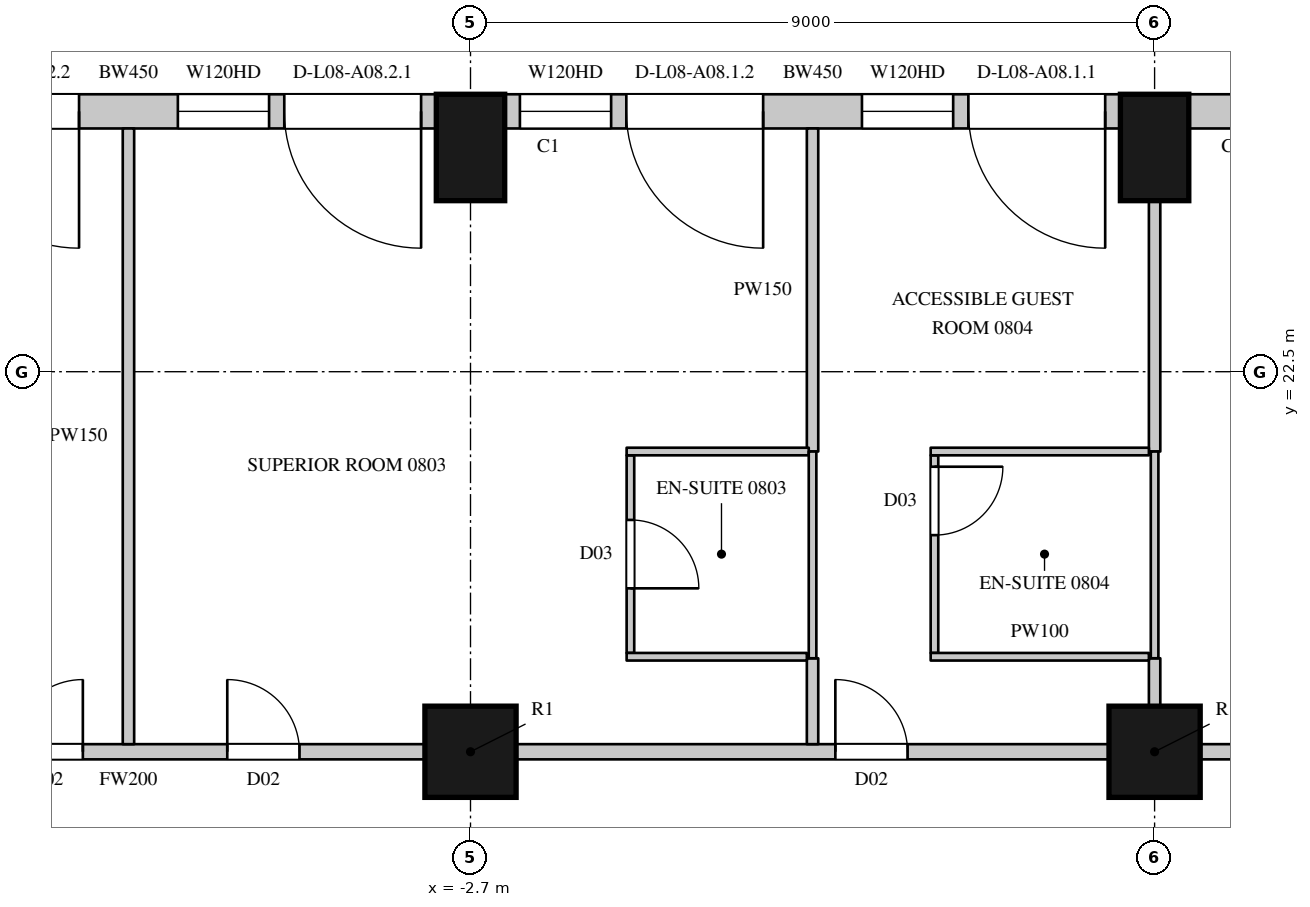
"""IFC4 building model, lengths in metres.
Left out: names, types, materials, properties, quantities, classifications, styles, units other than length and angle.
Written with IfcOpenShell. Run it as: python <this file> out.ifc"""

import sys

from ifc_helpers import new_model, si_unit, direction, frame, frame_2d, origin, origin_2d, place, context, subcontext, project, spatial, rectangle, circle, extrude, element, fill, save


model = new_model("IFC4")
c1 = context("Model", 3, precision=1e-05, world=origin(), true_north=direction((0.0, 1.0)))
c2 = subcontext(c1, "Body", "Model", "MODEL_VIEW")
j1 = project(units=[si_unit("LENGTHUNIT", "METRE"), si_unit("PLANEANGLEUNIT", "RADIAN")], contexts=[c1])
p1 = place(None, origin())
s1 = spatial("IfcSite", under=j1, at=p1, CompositionType="ELEMENT")
p2 = place(p1, origin())
s2 = spatial("IfcBuilding", under=s1, at=p2, CompositionType="ELEMENT")
p3 = place(p2, frame((0.0, 0.0, 59.1)))
s3 = spatial("IfcBuildingStorey", under=s2, at=p3, CompositionType="ELEMENT", Elevation=59.1)
for number, where, z_axis, x_axis in (
    (1, (6.3, 25.45, 0.0), (0.0, 0.0, 1.0), (-1.0, 0.0, 0.0)),
    (2, (-2.7, 25.45, 0.0), (0.0, 0.0, 1.0), (-1.0, 0.0, 0.0)),
):
    element("IfcColumn", number, at=place(p3, frame(where, z_axis=z_axis, x_axis=x_axis)), inside=s3, PredefinedType="COLUMN", context=c2, shape_type="SweptSolid", body=[
        extrude(rectangle(XDim=0.9, YDim=1.4, at=origin_2d()), origin(), (0.0, 0.0, 1.0), 3.6),
    ])
for number, where, z_axis, x_axis in (
    (3, (-2.7, 17.5, 0.0), (0.0, 0.0, 1.0), (1.0, 0.0, 0.0)),
    (4, (6.3, 17.5, 0.0), (0.0, 0.0, 1.0), (1.0, 0.0, 0.0)),
):
    element("IfcColumn", number, at=place(p3, frame(where, z_axis=z_axis, x_axis=x_axis)), inside=s3, PredefinedType="COLUMN", context=c2, shape_type="SweptSolid", body=[
        extrude(circle(Radius=0.6, at=origin_2d()), origin(), (0.0, 0.0, 1.0), 3.6),
    ])
p4 = place(p3, frame((11.989, 25.925, 0.0), z_axis=(0.0, 0.0, 1.0), x_axis=(-1.0, 0.0, 0.0)))
e5 = element("IfcWall", 5, at=p4, inside=s3, PredefinedType="SOLIDWALL", context=c2, shape_type="SweptSolid", body=[
    extrude(rectangle(XDim=5.239, YDim=0.45, at=frame_2d((2.619, 0.0))), origin(), (0.0, 0.0, 1.0), 3.3),
])
p5 = place(p4, frame((1.77, 0.0, 1.05)))
e6 = element("IfcOpeningElement", 6, at=p5, cuts=e5, PredefinedType="OPENING", context=c2, shape_type="SweptSolid", body=[
    extrude(rectangle(XDim=2.1, YDim=2.0, at=frame_2d((1.05, 1.0))), frame((0.0, 0.235, 0.0), z_axis=(0.0, -1.0, 0.0), x_axis=(1.0, 0.0, 0.0)), (0.0, 0.0, 1.0), 0.47),
])
p6 = place(p3, frame((5.85, 25.925, 0.0), z_axis=(0.0, 0.0, 1.0), x_axis=(-1.0, 0.0, 0.0)))
e7 = element("IfcWall", 7, at=p6, inside=s3, PredefinedType="SOLIDWALL", context=c2, shape_type="SweptSolid", body=[
    extrude(rectangle(XDim=8.1, YDim=0.45, at=frame_2d((4.05, 0.0))), origin(), (0.0, 0.0, 1.0), 3.3),
])
p7 = place(p6, frame((0.2, 0.0, 0.0)))
e8 = element("IfcOpeningElement", 8, at=p7, cuts=e7, PredefinedType="OPENING", context=c2, shape_type="SweptSolid", body=[
    extrude(rectangle(XDim=1.8, YDim=2.4, at=frame_2d((0.9, 1.2))), frame((0.0, 0.235, 0.0), z_axis=(0.0, -1.0, 0.0), x_axis=(1.0, 0.0, 0.0)), (0.0, 0.0, 1.0), 0.47),
])
p8 = place(p6, frame((2.2, 0.0, 1.05)))
e9 = element("IfcOpeningElement", 9, at=p8, cuts=e7, PredefinedType="OPENING", context=c2, shape_type="SweptSolid", body=[
    extrude(rectangle(XDim=1.2, YDim=2.0, at=frame_2d((0.6, 1.0))), frame((0.0, 0.235, 0.0), z_axis=(0.0, -1.0, 0.0), x_axis=(1.0, 0.0, 0.0)), (0.0, 0.0, 1.0), 0.47),
])
p9 = place(p6, frame((4.7, 0.0, 0.0)))
e10 = element("IfcOpeningElement", 10, at=p9, cuts=e7, PredefinedType="OPENING", context=c2, shape_type="SweptSolid", body=[
    extrude(rectangle(XDim=1.8, YDim=2.4, at=frame_2d((0.9, 1.2))), frame((0.0, 0.235, 0.0), z_axis=(0.0, -1.0, 0.0), x_axis=(1.0, 0.0, 0.0)), (0.0, 0.0, 1.0), 0.47),
])
p10 = place(p6, frame((6.7, 0.0, 1.05)))
e11 = element("IfcOpeningElement", 11, at=p10, cuts=e7, PredefinedType="OPENING", context=c2, shape_type="SweptSolid", body=[
    extrude(rectangle(XDim=1.2, YDim=2.0, at=frame_2d((0.6, 1.0))), frame((0.0, 0.235, 0.0), z_axis=(0.0, -1.0, 0.0), x_axis=(1.0, 0.0, 0.0)), (0.0, 0.0, 1.0), 0.47),
])
p11 = place(p3, frame((-3.15, 25.925, 0.0), z_axis=(0.0, 0.0, 1.0), x_axis=(-1.0, 0.0, 0.0)))
e12 = element("IfcWall", 12, at=p11, inside=s3, PredefinedType="SOLIDWALL", context=c2, shape_type="SweptSolid", body=[
    extrude(rectangle(XDim=8.1, YDim=0.45, at=frame_2d((4.05, 0.0))), origin(), (0.0, 0.0, 1.0), 3.3),
])
p12 = place(p11, frame((0.2, 0.0, 0.0)))
e13 = element("IfcOpeningElement", 13, at=p12, cuts=e12, PredefinedType="OPENING", context=c2, shape_type="SweptSolid", body=[
    extrude(rectangle(XDim=1.8, YDim=2.4, at=frame_2d((0.9, 1.2))), frame((0.0, 0.235, 0.0), z_axis=(0.0, -1.0, 0.0), x_axis=(1.0, 0.0, 0.0)), (0.0, 0.0, 1.0), 0.47),
])
p13 = place(p11, frame((2.2, 0.0, 1.05)))
e14 = element("IfcOpeningElement", 14, at=p13, cuts=e12, PredefinedType="OPENING", context=c2, shape_type="SweptSolid", body=[
    extrude(rectangle(XDim=1.2, YDim=2.0, at=frame_2d((0.6, 1.0))), frame((0.0, 0.235, 0.0), z_axis=(0.0, -1.0, 0.0), x_axis=(1.0, 0.0, 0.0)), (0.0, 0.0, 1.0), 0.47),
])
p14 = place(p11, frame((4.7, 0.0, 0.0)))
e15 = element("IfcOpeningElement", 15, at=p14, cuts=e12, PredefinedType="OPENING", context=c2, shape_type="SweptSolid", body=[
    extrude(rectangle(XDim=1.8, YDim=2.4, at=frame_2d((0.9, 1.2))), frame((0.0, 0.235, 0.0), z_axis=(0.0, -1.0, 0.0), x_axis=(1.0, 0.0, 0.0)), (0.0, 0.0, 1.0), 0.47),
])
p15 = place(p11, frame((6.7, 0.0, 1.05)))
e16 = element("IfcOpeningElement", 16, at=p15, cuts=e12, PredefinedType="OPENING", context=c2, shape_type="SweptSolid", body=[
    extrude(rectangle(XDim=1.2, YDim=2.0, at=frame_2d((0.6, 1.0))), frame((0.0, 0.235, 0.0), z_axis=(0.0, -1.0, 0.0), x_axis=(1.0, 0.0, 0.0)), (0.0, 0.0, 1.0), 0.47),
])
p16 = place(p3, frame((-11.1, 17.5, 0.0), z_axis=(0.0, 0.0, 1.0), x_axis=(1.0, 0.0, 0.0)))
e17 = element("IfcWall", 17, at=p16, inside=s3, PredefinedType="PARTITIONING", context=c2, shape_type="SweptSolid", body=[
    extrude(rectangle(XDim=7.8, YDim=0.2, at=frame_2d((3.9, 0.0))), origin(), (0.0, 0.0, 1.0), 2.75),
])
p17 = place(p16, frame((2.35, 0.0, 0.0)))
e18 = element("IfcOpeningElement", 18, at=p17, cuts=e17, PredefinedType="OPENING", context=c2, shape_type="SweptSolid", body=[
    extrude(rectangle(XDim=0.95, YDim=2.2, at=frame_2d((0.475, 1.1))), frame((0.0, 0.11, 0.0), z_axis=(0.0, -1.0, 0.0), x_axis=(1.0, 0.0, 0.0)), (0.0, 0.0, 1.0), 0.22),
])
p18 = place(p16, frame((5.2, 0.0, 0.0)))
e19 = element("IfcOpeningElement", 19, at=p18, cuts=e17, PredefinedType="OPENING", context=c2, shape_type="SweptSolid", body=[
    extrude(rectangle(XDim=0.95, YDim=2.2, at=frame_2d((0.475, 1.1))), frame((0.0, 0.11, 0.0), z_axis=(0.0, -1.0, 0.0), x_axis=(1.0, 0.0, 0.0)), (0.0, 0.0, 1.0), 0.22),
])
p19 = place(p3, frame((-2.1, 17.5, 0.0), z_axis=(0.0, 0.0, 1.0), x_axis=(1.0, 0.0, 0.0)))
e20 = element("IfcWall", 20, at=p19, inside=s3, PredefinedType="PARTITIONING", context=c2, shape_type="SweptSolid", body=[
    extrude(rectangle(XDim=7.8, YDim=0.2, at=frame_2d((3.9, 0.0))), origin(), (0.0, 0.0, 1.0), 2.75),
])
p20 = place(p19, frame((4.2, 0.0, 0.0)))
e21 = element("IfcOpeningElement", 21, at=p20, cuts=e20, PredefinedType="OPENING", context=c2, shape_type="SweptSolid", body=[
    extrude(rectangle(XDim=0.95, YDim=2.2, at=frame_2d((0.475, 1.1))), frame((0.0, 0.11, 0.0), z_axis=(0.0, -1.0, 0.0), x_axis=(1.0, 0.0, 0.0)), (0.0, 0.0, 1.0), 0.22),
])
p21 = place(p3, frame((6.9, 17.5, 0.0), z_axis=(0.0, 0.0, 1.0), x_axis=(1.0, 0.0, 0.0)))
e22 = element("IfcWall", 22, at=p21, inside=s3, PredefinedType="PARTITIONING", context=c2, shape_type="SweptSolid", body=[
    extrude(rectangle(XDim=7.8, YDim=0.2, at=frame_2d((3.9, 0.0))), origin(), (0.0, 0.0, 1.0), 2.75),
])
p22 = place(p21, frame((1.45, 0.0, 0.0)))
e23 = element("IfcOpeningElement", 23, at=p22, cuts=e22, PredefinedType="OPENING", context=c2, shape_type="SweptSolid", body=[
    extrude(rectangle(XDim=1.1, YDim=2.4, at=frame_2d((0.55, 1.2))), frame((0.0, 0.11, 0.0), z_axis=(0.0, -1.0, 0.0), x_axis=(1.0, 0.0, 0.0)), (0.0, 0.0, 1.0), 0.22),
])
p23 = place(p3, frame((-7.2, 17.6, 0.0), z_axis=(0.0, 0.0, 1.0), x_axis=(0.0, 1.0, 0.0)))
e24 = element("IfcWall", 24, at=p23, inside=s3, PredefinedType="PARTITIONING", context=c2, shape_type="SweptSolid", body=[
    extrude(rectangle(XDim=8.1, YDim=0.15, at=frame_2d((4.05, 0.0))), origin(), (0.0, 0.0, 1.0), 2.65),
])
p24 = place(p3, frame((1.8, 17.6, 0.0), z_axis=(0.0, 0.0, 1.0), x_axis=(0.0, 1.0, 0.0)))
e25 = element("IfcWall", 25, at=p24, inside=s3, PredefinedType="PARTITIONING", context=c2, shape_type="SweptSolid", body=[
    extrude(rectangle(XDim=1.13, YDim=0.15, at=frame_2d((0.565, 0.0))), origin(), (0.0, 0.0, 1.0), 2.65),
])
p25 = place(p3, frame((1.8, 21.45, 0.0), z_axis=(0.0, 0.0, 1.0), x_axis=(0.0, 1.0, 0.0)))
e26 = element("IfcWall", 26, at=p25, inside=s3, PredefinedType="PARTITIONING", context=c2, shape_type="SweptSolid", body=[
    extrude(rectangle(XDim=4.25, YDim=0.15, at=frame_2d((2.125, 0.0))), origin(), (0.0, 0.0, 1.0), 2.65),
])
p26 = place(p3, frame((6.3, 18.1, 0.0), z_axis=(0.0, 0.0, 1.0), x_axis=(0.0, 1.0, 0.0)))
e27 = element("IfcWall", 27, at=p26, inside=s3, PredefinedType="PARTITIONING", context=c2, shape_type="SweptSolid", body=[
    extrude(rectangle(XDim=0.63, YDim=0.15, at=frame_2d((0.315, 0.0))), origin(), (0.0, 0.0, 1.0), 2.75),
])
p27 = place(p3, frame((6.3, 21.45, 0.0), z_axis=(0.0, 0.0, 1.0), x_axis=(0.0, 1.0, 0.0)))
e28 = element("IfcWall", 28, at=p27, inside=s3, PredefinedType="PARTITIONING", context=c2, shape_type="SweptSolid", body=[
    extrude(rectangle(XDim=3.3, YDim=0.15, at=frame_2d((1.65, 0.0))), origin(), (0.0, 0.0, 1.0), 2.75),
])
p28 = place(p3, frame((-0.596, 18.8, 0.0), z_axis=(0.0, 0.0, 1.0), x_axis=(0.0, 1.0, 0.0)))
e29 = element("IfcWall", 29, at=p28, inside=s3, PredefinedType="PARTITIONING", context=c2, shape_type="SweptSolid", body=[
    extrude(rectangle(XDim=2.6, YDim=0.1, at=frame_2d((1.3, 0.0))), origin(), (0.0, 0.0, 1.0), 3.3),
])
p29 = place(p28, frame((0.85, 0.0, 0.0)))
e30 = element("IfcOpeningElement", 30, at=p29, cuts=e29, PredefinedType="OPENING", context=c2, shape_type="SweptSolid", body=[
    extrude(rectangle(XDim=0.9, YDim=2.2, at=frame_2d((0.45, 1.1))), frame((0.0, 0.06, 0.0), z_axis=(0.0, -1.0, 0.0), x_axis=(1.0, 0.0, 0.0)), (0.0, 0.0, 1.0), 0.12),
])
p30 = place(p3, frame((-0.646, 18.75, 0.0), z_axis=(0.0, 0.0, 1.0), x_axis=(1.0, 0.0, 0.0)))
e31 = element("IfcWall", 31, at=p30, inside=s3, PredefinedType="PARTITIONING", context=c2, shape_type="SweptSolid", body=[
    extrude(rectangle(XDim=2.371, YDim=0.1, at=frame_2d((1.186, 0.0))), origin(), (0.0, 0.0, 1.0), 3.3),
])
p31 = place(p3, frame((-0.646, 21.45, 0.0), z_axis=(0.0, 0.0, 1.0), x_axis=(1.0, 0.0, 0.0)))
e32 = element("IfcWall", 32, at=p31, inside=s3, PredefinedType="PARTITIONING", context=c2, shape_type="SweptSolid", body=[
    extrude(rectangle(XDim=2.396, YDim=0.1, at=frame_2d((1.198, 0.0))), origin(), (0.0, 0.0, 1.0), 3.3),
])
p32 = place(p3, frame((1.8, 18.73, 0.0), z_axis=(0.0, 0.0, 1.0), x_axis=(0.0, 1.0, 0.0)))
e33 = element("IfcWall", 33, at=p32, inside=s3, PredefinedType="PARTITIONING", context=c2, shape_type="SweptSolid", body=[
    extrude(rectangle(XDim=2.72, YDim=0.1, at=frame_2d((1.36, 0.0))), origin(), (0.0, 0.0, 1.0), 2.65),
])
p33 = place(p3, frame((3.404, 18.8, 0.0), z_axis=(0.0, 0.0, 1.0), x_axis=(0.0, 1.0, 0.0)))
e34 = element("IfcWall", 34, at=p33, inside=s3, PredefinedType="PARTITIONING", context=c2, shape_type="SweptSolid", body=[
    extrude(rectangle(XDim=2.6, YDim=0.1, at=frame_2d((1.3, 0.0))), origin(), (0.0, 0.0, 1.0), 3.3),
])
p34 = place(p33, frame((1.55, 0.0, 0.0)))
e35 = element("IfcOpeningElement", 35, at=p34, cuts=e34, PredefinedType="OPENING", context=c2, shape_type="SweptSolid", body=[
    extrude(rectangle(XDim=0.9, YDim=2.2, at=frame_2d((0.45, 1.1))), frame((0.0, 0.06, 0.0), z_axis=(0.0, -1.0, 0.0), x_axis=(1.0, 0.0, 0.0)), (0.0, 0.0, 1.0), 0.12),
])
for number, where, z_axis, x_axis in (
    (36, (3.354, 18.75, 0.0), (0.0, 0.0, 1.0), (1.0, 0.0, 0.0)),
    (37, (3.354, 21.45, 0.0), (0.0, 0.0, 1.0), (1.0, 0.0, 0.0)),
):
    element("IfcWall", number, at=place(p3, frame(where, z_axis=z_axis, x_axis=x_axis)), inside=s3, PredefinedType="PARTITIONING", context=c2, shape_type="SweptSolid", body=[
        extrude(rectangle(XDim=2.871, YDim=0.1, at=frame_2d((1.436, 0.0))), origin(), (0.0, 0.0, 1.0), 3.3),
    ])
p35 = place(p3, frame((6.3, 18.73, 0.0), z_axis=(0.0, 0.0, 1.0), x_axis=(0.0, 1.0, 0.0)))
e38 = element("IfcWall", 38, at=p35, inside=s3, PredefinedType="PARTITIONING", context=c2, shape_type="SweptSolid", body=[
    extrude(rectangle(XDim=2.72, YDim=0.1, at=frame_2d((1.36, 0.0))), origin(), (0.0, 0.0, 1.0), 2.75),
])
p36 = place(p7, origin())
e39 = element("IfcDoor", 39, at=p36, inside=s3, OperationType="SLIDING_TO_LEFT", PredefinedType="DOOR", context=c2, shape_type="SweptSolid", body=[
    extrude(rectangle(XDim=1.8, YDim=2.4, at=frame_2d((0.9, 1.2))), frame((0.0, 0.13, 0.0), z_axis=(0.0, -1.0, 0.0), x_axis=(1.0, 0.0, 0.0)), (0.0, 0.0, 1.0), 0.05),
])
fill(e8, e39)
p37 = place(p8, origin())
e40 = element("IfcWindow", 40, at=p37, inside=s3, PartitioningType="SINGLE_PANEL", PredefinedType="WINDOW", context=c2, shape_type="SweptSolid", body=[
    extrude(rectangle(XDim=1.2, YDim=2.0, at=frame_2d((0.6, 1.0))), frame((0.0, 0.135, 0.0), z_axis=(0.0, -1.0, 0.0), x_axis=(1.0, 0.0, 0.0)), (0.0, 0.0, 1.0), 0.06),
])
fill(e9, e40)
p38 = place(p9, origin())
e41 = element("IfcDoor", 41, at=p38, inside=s3, OperationType="SLIDING_TO_LEFT", PredefinedType="DOOR", context=c2, shape_type="SweptSolid", body=[
    extrude(rectangle(XDim=1.8, YDim=2.4, at=frame_2d((0.9, 1.2))), frame((0.0, 0.13, 0.0), z_axis=(0.0, -1.0, 0.0), x_axis=(1.0, 0.0, 0.0)), (0.0, 0.0, 1.0), 0.05),
])
fill(e10, e41)
p39 = place(p10, origin())
e42 = element("IfcWindow", 42, at=p39, inside=s3, PartitioningType="SINGLE_PANEL", PredefinedType="WINDOW", context=c2, shape_type="SweptSolid", body=[
    extrude(rectangle(XDim=1.2, YDim=2.0, at=frame_2d((0.6, 1.0))), frame((0.0, 0.135, 0.0), z_axis=(0.0, -1.0, 0.0), x_axis=(1.0, 0.0, 0.0)), (0.0, 0.0, 1.0), 0.06),
])
fill(e11, e42)
p40 = place(p12, origin())
e43 = element("IfcDoor", 43, at=p40, inside=s3, OperationType="SLIDING_TO_LEFT", PredefinedType="DOOR", context=c2, shape_type="SweptSolid", body=[
    extrude(rectangle(XDim=1.8, YDim=2.4, at=frame_2d((0.9, 1.2))), frame((0.0, 0.13, 0.0), z_axis=(0.0, -1.0, 0.0), x_axis=(1.0, 0.0, 0.0)), (0.0, 0.0, 1.0), 0.05),
])
fill(e13, e43)
p41 = place(p13, origin())
e44 = element("IfcWindow", 44, at=p41, inside=s3, PartitioningType="SINGLE_PANEL", PredefinedType="WINDOW", context=c2, shape_type="SweptSolid", body=[
    extrude(rectangle(XDim=1.2, YDim=2.0, at=frame_2d((0.6, 1.0))), frame((0.0, 0.135, 0.0), z_axis=(0.0, -1.0, 0.0), x_axis=(1.0, 0.0, 0.0)), (0.0, 0.0, 1.0), 0.06),
])
fill(e14, e44)
p42 = place(p14, origin())
e45 = element("IfcDoor", 45, at=p42, inside=s3, OperationType="SLIDING_TO_LEFT", PredefinedType="DOOR", context=c2, shape_type="SweptSolid", body=[
    extrude(rectangle(XDim=1.8, YDim=2.4, at=frame_2d((0.9, 1.2))), frame((0.0, 0.13, 0.0), z_axis=(0.0, -1.0, 0.0), x_axis=(1.0, 0.0, 0.0)), (0.0, 0.0, 1.0), 0.05),
])
fill(e15, e45)
p43 = place(p17, origin())
e46 = element("IfcDoor", 46, at=p43, inside=s3, OperationType="SINGLE_SWING_RIGHT", PredefinedType="DOOR", context=c2, shape_type="SweptSolid", body=[
    extrude(rectangle(XDim=0.95, YDim=2.2, at=frame_2d((0.475, 1.1))), frame((0.0, 0.025, 0.0), z_axis=(0.0, -1.0, 0.0), x_axis=(1.0, 0.0, 0.0)), (0.0, 0.0, 1.0), 0.05),
])
fill(e18, e46)
p44 = place(p18, origin())
e47 = element("IfcDoor", 47, at=p44, inside=s3, OperationType="SINGLE_SWING_LEFT", PredefinedType="DOOR", context=c2, shape_type="SweptSolid", body=[
    extrude(rectangle(XDim=0.95, YDim=2.2, at=frame_2d((0.475, 1.1))), frame((0.0, 0.025, 0.0), z_axis=(0.0, -1.0, 0.0), x_axis=(1.0, 0.0, 0.0)), (0.0, 0.0, 1.0), 0.05),
])
fill(e19, e47)
p45 = place(p29, origin())
e48 = element("IfcDoor", 48, at=p45, inside=s3, OperationType="SINGLE_SWING_RIGHT", PredefinedType="DOOR", context=c2, shape_type="SweptSolid", body=[
    extrude(rectangle(XDim=0.9, YDim=2.2, at=frame_2d((0.45, 1.1))), frame((0.0, 0.025, 0.0), z_axis=(0.0, -1.0, 0.0), x_axis=(1.0, 0.0, 0.0)), (0.0, 0.0, 1.0), 0.05),
])
fill(e30, e48)
p46 = place(p20, origin())
e49 = element("IfcDoor", 49, at=p46, inside=s3, OperationType="SINGLE_SWING_LEFT", PredefinedType="DOOR", context=c2, shape_type="SweptSolid", body=[
    extrude(rectangle(XDim=0.95, YDim=2.2, at=frame_2d((0.475, 1.1))), frame((0.0, 0.025, 0.0), z_axis=(0.0, -1.0, 0.0), x_axis=(1.0, 0.0, 0.0)), (0.0, 0.0, 1.0), 0.05),
])
fill(e21, e49)
p47 = place(p34, origin())
e50 = element("IfcDoor", 50, at=p47, inside=s3, OperationType="SINGLE_SWING_LEFT", PredefinedType="DOOR", context=c2, shape_type="SweptSolid", body=[
    extrude(rectangle(XDim=0.9, YDim=2.2, at=frame_2d((0.45, 1.1))), frame((0.0, 0.025, 0.0), z_axis=(0.0, -1.0, 0.0), x_axis=(1.0, 0.0, 0.0)), (0.0, 0.0, 1.0), 0.05),
])
fill(e35, e50)
save(model, sys.argv[1])
